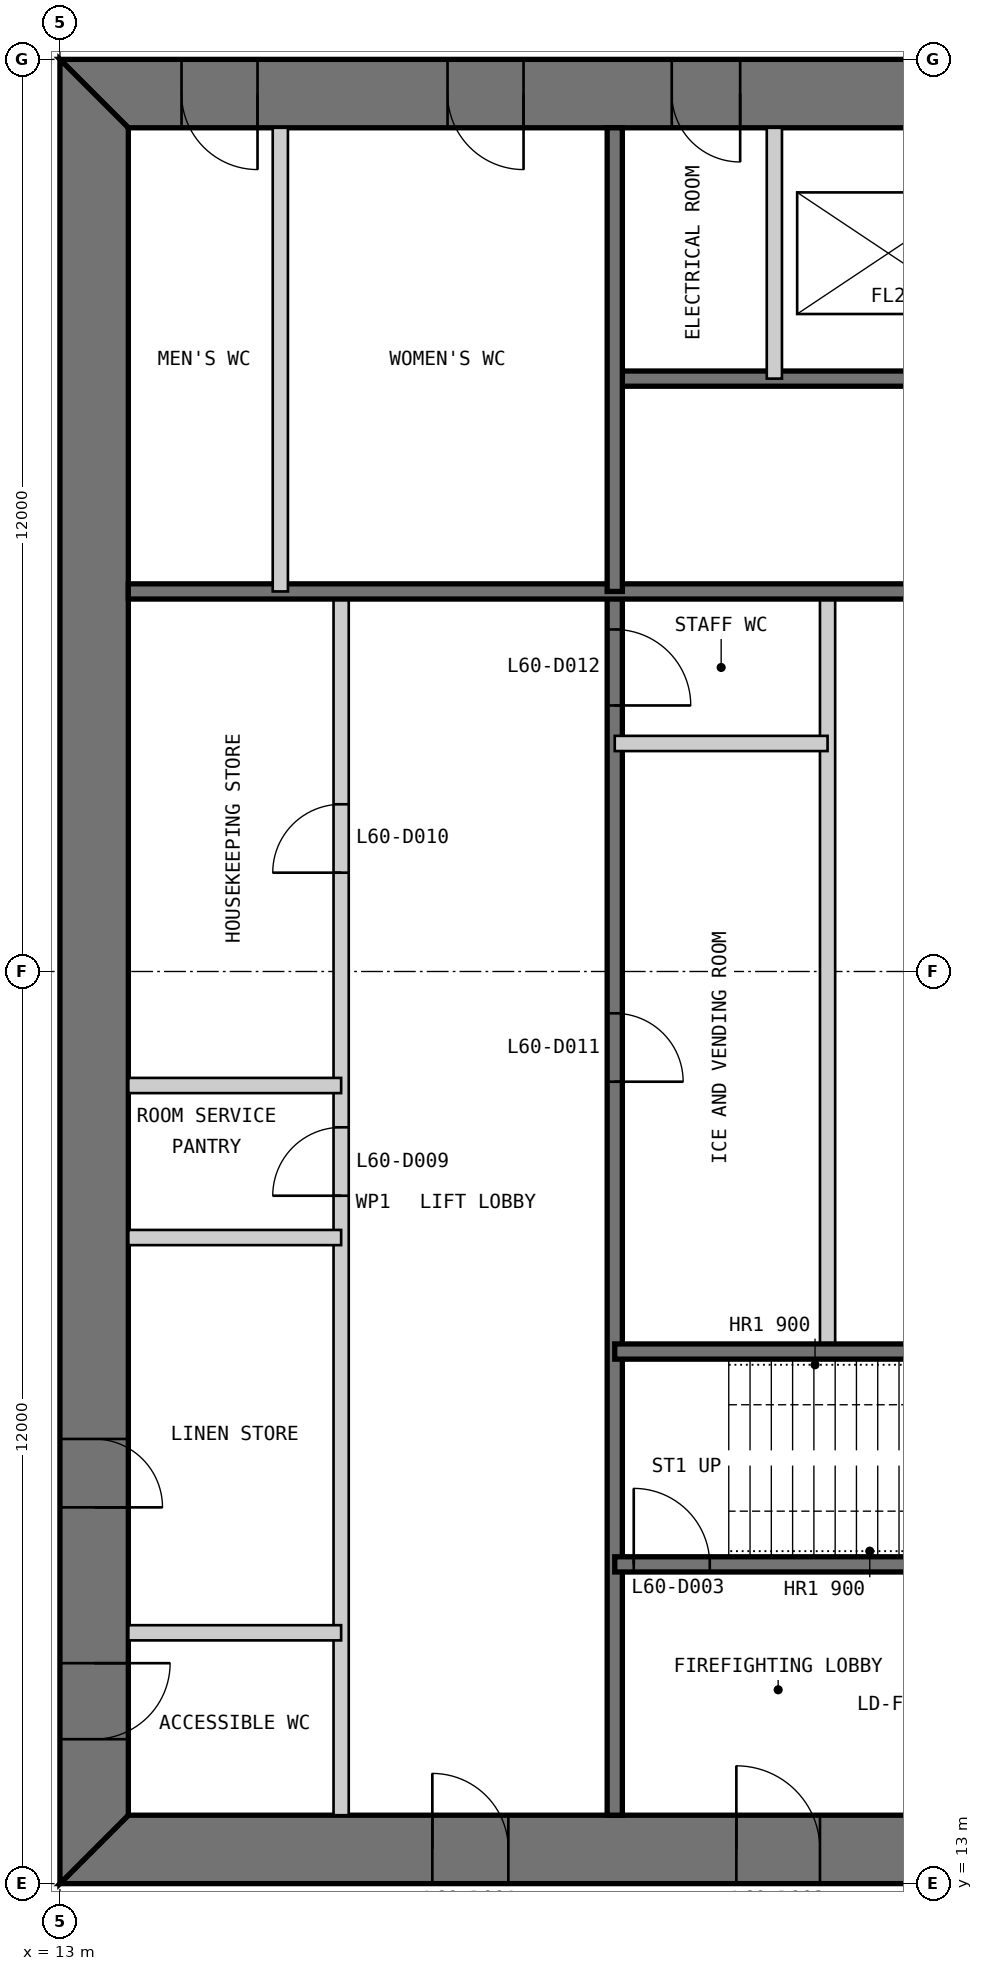
"""IFC4 building model, lengths in metres.
Left out: names, types, materials, properties, quantities, classifications, styles, units other than length and angle.
Written with IfcOpenShell. Run it as: python <this file> out.ifc"""

import sys

from ifc_helpers import new_model, si_unit, direction, frame, frame_2d, origin, place, context, subcontext, project, spatial, polyline, rectangle, outline, extrude, element, fill, save


model = new_model("IFC4")
c1 = context("Model", 3, precision=1e-05, world=origin(), true_north=direction((0.0, 1.0)))
c2 = subcontext(c1, "Body", "Model", "MODEL_VIEW")
j1 = project(units=[si_unit("LENGTHUNIT", "METRE"), si_unit("PLANEANGLEUNIT", "RADIAN")], contexts=[c1])
p1 = place(None, origin())
s1 = spatial("IfcSite", under=j1, at=p1, CompositionType="ELEMENT")
p2 = place(p1, origin())
s2 = spatial("IfcBuilding", under=s1, at=p2, CompositionType="ELEMENT")
p3 = place(p2, frame((0.0, 0.0, 256.0)))
s3 = spatial("IfcBuildingStorey", under=s2, at=p3, CompositionType="ELEMENT", Elevation=256.0)
p4 = place(p3, frame((13.0, 13.45, 0.0), z_axis=(0.0, 0.0, 1.0), x_axis=(1.0, 0.0, 0.0)))
e1 = element("IfcWall", 1, at=p4, inside=s3, PredefinedType="SHEAR", context=c2, shape_type="SweptSolid", body=[
    extrude(outline(polyline([(0.0, -0.45), (24.0, -0.45), (23.1, 0.45), (0.9, 0.45), (0.0, -0.45)])), origin(), (0.0, 0.0, 1.0), 3.4),
])
p5 = place(p4, frame((4.9, 0.0, 0.0)))
e2 = element("IfcOpeningElement", 2, at=p5, cuts=e1, PredefinedType="OPENING", context=c2, shape_type="SweptSolid", body=[
    extrude(rectangle(XDim=1.0, YDim=2.2, at=frame_2d((0.5, 1.1))), frame((0.0, 0.46, 0.0), z_axis=(0.0, -1.0, 0.0), x_axis=(1.0, 0.0, 0.0)), (0.0, 0.0, 1.0), 0.92),
])
p6 = place(p4, frame((8.9, 0.0, 0.0)))
e3 = element("IfcOpeningElement", 3, at=p6, cuts=e1, PredefinedType="OPENING", context=c2, shape_type="SweptSolid", body=[
    extrude(rectangle(XDim=1.1, YDim=2.2, at=frame_2d((0.55, 1.1))), frame((0.0, 0.46, 0.0), z_axis=(0.0, -1.0, 0.0), x_axis=(1.0, 0.0, 0.0)), (0.0, 0.0, 1.0), 0.92),
])
p7 = place(p4, frame((15.05, 0.0, 0.0)))
e4 = element("IfcOpeningElement", 4, at=p7, cuts=e1, PredefinedType="OPENING", context=c2, shape_type="SweptSolid", body=[
    extrude(rectangle(XDim=0.9, YDim=2.2, at=frame_2d((0.45, 1.1))), frame((0.0, 0.46, 0.0), z_axis=(0.0, -1.0, 0.0), x_axis=(1.0, 0.0, 0.0)), (0.0, 0.0, 1.0), 0.92),
])
p8 = place(p4, frame((17.9, 0.0, 0.0)))
e5 = element("IfcOpeningElement", 5, at=p8, cuts=e1, PredefinedType="OPENING", context=c2, shape_type="SweptSolid", body=[
    extrude(rectangle(XDim=1.0, YDim=2.2, at=frame_2d((0.5, 1.1))), frame((0.0, 0.46, 0.0), z_axis=(0.0, -1.0, 0.0), x_axis=(1.0, 0.0, 0.0)), (0.0, 0.0, 1.0), 0.92),
])
p9 = place(p4, frame((21.4, 0.0, 0.0)))
e6 = element("IfcOpeningElement", 6, at=p9, cuts=e1, PredefinedType="OPENING", context=c2, shape_type="SweptSolid", body=[
    extrude(rectangle(XDim=1.0, YDim=2.2, at=frame_2d((0.5, 1.1))), frame((0.0, 0.46, 0.0), z_axis=(0.0, -1.0, 0.0), x_axis=(1.0, 0.0, 0.0)), (0.0, 0.0, 1.0), 0.92),
])
p10 = place(p3, frame((37.0, 36.55, 0.0), z_axis=(0.0, 0.0, 1.0), x_axis=(-1.0, 0.0, 0.0)))
e7 = element("IfcWall", 7, at=p10, inside=s3, PredefinedType="SHEAR", context=c2, shape_type="SweptSolid", body=[
    extrude(outline(polyline([(0.0, -0.45), (24.0, -0.45), (23.1, 0.45), (0.9, 0.45), (0.0, -0.45)])), origin(), (0.0, 0.0, 1.0), 3.4),
])
p11 = place(p10, frame((4.9, 0.0, 0.0)))
e8 = element("IfcOpeningElement", 8, at=p11, cuts=e7, PredefinedType="OPENING", context=c2, shape_type="SweptSolid", body=[
    extrude(rectangle(XDim=1.0, YDim=2.2, at=frame_2d((0.5, 1.1))), frame((0.0, 0.46, 0.0), z_axis=(0.0, -1.0, 0.0), x_axis=(1.0, 0.0, 0.0)), (0.0, 0.0, 1.0), 0.92),
])
p12 = place(p10, frame((8.9, 0.0, 0.0)))
e9 = element("IfcOpeningElement", 9, at=p12, cuts=e7, PredefinedType="OPENING", context=c2, shape_type="SweptSolid", body=[
    extrude(rectangle(XDim=1.1, YDim=2.2, at=frame_2d((0.55, 1.1))), frame((0.0, 0.46, 0.0), z_axis=(0.0, -1.0, 0.0), x_axis=(1.0, 0.0, 0.0)), (0.0, 0.0, 1.0), 0.92),
])
p13 = place(p10, frame((15.05, 0.0, 0.0)))
e10 = element("IfcOpeningElement", 10, at=p13, cuts=e7, PredefinedType="OPENING", context=c2, shape_type="SweptSolid", body=[
    extrude(rectangle(XDim=0.9, YDim=2.2, at=frame_2d((0.45, 1.1))), frame((0.0, 0.46, 0.0), z_axis=(0.0, -1.0, 0.0), x_axis=(1.0, 0.0, 0.0)), (0.0, 0.0, 1.0), 0.92),
])
p14 = place(p10, frame((17.9, 0.0, 0.0)))
e11 = element("IfcOpeningElement", 11, at=p14, cuts=e7, PredefinedType="OPENING", context=c2, shape_type="SweptSolid", body=[
    extrude(rectangle(XDim=1.0, YDim=2.2, at=frame_2d((0.5, 1.1))), frame((0.0, 0.46, 0.0), z_axis=(0.0, -1.0, 0.0), x_axis=(1.0, 0.0, 0.0)), (0.0, 0.0, 1.0), 0.92),
])
p15 = place(p10, frame((21.4, 0.0, 0.0)))
e12 = element("IfcOpeningElement", 12, at=p15, cuts=e7, PredefinedType="OPENING", context=c2, shape_type="SweptSolid", body=[
    extrude(rectangle(XDim=1.0, YDim=2.2, at=frame_2d((0.5, 1.1))), frame((0.0, 0.46, 0.0), z_axis=(0.0, -1.0, 0.0), x_axis=(1.0, 0.0, 0.0)), (0.0, 0.0, 1.0), 0.92),
])
p16 = place(p3, frame((13.45, 36.1, 0.0), z_axis=(0.0, 0.0, 1.0), x_axis=(0.0, -1.0, 0.0)))
e13 = element("IfcWall", 13, at=p16, inside=s3, PredefinedType="SHEAR", context=c2, shape_type="SweptSolid", body=[
    extrude(outline(polyline([(-0.9, -0.45), (23.1, -0.45), (22.2, 0.45), (0.0, 0.45), (-0.9, -0.45)])), origin(), (0.0, 0.0, 1.0), 3.4),
])
p17 = place(p16, frame((20.2, 0.0, 0.0)))
e14 = element("IfcOpeningElement", 14, at=p17, cuts=e13, PredefinedType="OPENING", context=c2, shape_type="SweptSolid", body=[
    extrude(rectangle(XDim=1.0, YDim=2.2, at=frame_2d((0.5, 1.1))), frame((0.0, 0.46, 0.0), z_axis=(0.0, -1.0, 0.0), x_axis=(1.0, 0.0, 0.0)), (0.0, 0.0, 1.0), 0.92),
])
p18 = place(p16, frame((17.25, 0.0, 0.0)))
e15 = element("IfcOpeningElement", 15, at=p18, cuts=e13, PredefinedType="OPENING", context=c2, shape_type="SweptSolid", body=[
    extrude(rectangle(XDim=0.9, YDim=2.2, at=frame_2d((0.45, 1.1))), frame((0.0, 0.46, 0.0), z_axis=(0.0, -1.0, 0.0), x_axis=(1.0, 0.0, 0.0)), (0.0, 0.0, 1.0), 0.92),
])
p19 = place(p3, frame((16.7, 13.9, 0.0), z_axis=(0.0, 0.0, 1.0), x_axis=(0.0, 1.0, 0.0)))
e16 = element("IfcWall", 16, at=p19, inside=s3, PredefinedType="PARTITIONING", context=c2, shape_type="SweptSolid", body=[
    extrude(rectangle(XDim=16.1, YDim=0.2, at=frame_2d((8.05, 0.0))), origin(), (0.0, 0.0, 1.0), 3.2),
])
p20 = place(p19, frame((8.15, 0.0, 0.0)))
e17 = element("IfcOpeningElement", 17, at=p20, cuts=e16, PredefinedType="OPENING", context=c2, shape_type="SweptSolid", body=[
    extrude(rectangle(XDim=0.9, YDim=2.2, at=frame_2d((0.45, 1.1))), frame((0.0, 0.11, 0.0), z_axis=(0.0, -1.0, 0.0), x_axis=(1.0, 0.0, 0.0)), (0.0, 0.0, 1.0), 0.22),
])
p21 = place(p19, frame((12.4, 0.0, 0.0)))
e18 = element("IfcOpeningElement", 18, at=p21, cuts=e16, PredefinedType="OPENING", context=c2, shape_type="SweptSolid", body=[
    extrude(rectangle(XDim=0.9, YDim=2.2, at=frame_2d((0.45, 1.1))), frame((0.0, 0.11, 0.0), z_axis=(0.0, -1.0, 0.0), x_axis=(1.0, 0.0, 0.0)), (0.0, 0.0, 1.0), 0.22),
])
p22 = place(p3, frame((20.3, 13.9, 0.0), z_axis=(0.0, 0.0, 1.0), x_axis=(0.0, 1.0, 0.0)))
e19 = element("IfcWall", 19, at=p22, inside=s3, PredefinedType="SOLIDWALL", context=c2, shape_type="SweptSolid", body=[
    extrude(rectangle(XDim=16.1, YDim=0.2, at=frame_2d((8.05, 0.0))), origin(), (0.0, 0.0, 1.0), 3.2),
])
p23 = place(p22, frame((9.65, 0.0, 0.0)))
e20 = element("IfcOpeningElement", 20, at=p23, cuts=e19, PredefinedType="OPENING", context=c2, shape_type="SweptSolid", body=[
    extrude(rectangle(XDim=0.9, YDim=2.2, at=frame_2d((0.45, 1.1))), frame((0.0, 0.11, 0.0), z_axis=(0.0, -1.0, 0.0), x_axis=(1.0, 0.0, 0.0)), (0.0, 0.0, 1.0), 0.22),
])
p24 = place(p22, frame((14.6, 0.0, 0.0)))
e21 = element("IfcOpeningElement", 21, at=p24, cuts=e19, PredefinedType="OPENING", context=c2, shape_type="SweptSolid", body=[
    extrude(rectangle(XDim=1.0, YDim=2.2, at=frame_2d((0.5, 1.1))), frame((0.0, 0.11, 0.0), z_axis=(0.0, -1.0, 0.0), x_axis=(1.0, 0.0, 0.0)), (0.0, 0.0, 1.0), 0.22),
])
p25 = place(p3, frame((23.1, 20.0, 0.0), z_axis=(0.0, 0.0, 1.0), x_axis=(0.0, 1.0, 0.0)))
e22 = element("IfcWall", 22, at=p25, inside=s3, PredefinedType="PARTITIONING", context=c2, shape_type="SweptSolid", body=[
    extrude(rectangle(XDim=10.0, YDim=0.2, at=frame_2d((5.0, 0.0))), origin(), (0.0, 0.0, 1.0), 3.2),
])
p26 = place(p3, frame((20.3, 17.2, 0.0), z_axis=(0.0, 0.0, 1.0), x_axis=(1.0, 0.0, 0.0)))
e23 = element("IfcWall", 23, at=p26, inside=s3, PredefinedType="SOLIDWALL", context=c2, shape_type="SweptSolid", body=[
    extrude(rectangle(XDim=9.4, YDim=0.2, at=frame_2d((4.7, 0.0))), origin(), (0.0, 0.0, 1.0), 3.2),
])
p27 = place(p26, frame((0.25, 0.0, 0.0)))
e24 = element("IfcOpeningElement", 24, at=p27, cuts=e23, PredefinedType="OPENING", context=c2, shape_type="SweptSolid", body=[
    extrude(rectangle(XDim=1.0, YDim=2.2, at=frame_2d((0.5, 1.1))), frame((0.0, 0.11, 0.0), z_axis=(0.0, -1.0, 0.0), x_axis=(1.0, 0.0, 0.0)), (0.0, 0.0, 1.0), 0.22),
])
p28 = place(p3, frame((20.3, 20.0, 0.0), z_axis=(0.0, 0.0, 1.0), x_axis=(1.0, 0.0, 0.0)))
e25 = element("IfcWall", 25, at=p28, inside=s3, PredefinedType="SOLIDWALL", context=c2, shape_type="SweptSolid", body=[
    extrude(rectangle(XDim=15.8, YDim=0.2, at=frame_2d((7.9, 0.0))), origin(), (0.0, 0.0, 1.0), 3.2),
])
for number, where, z_axis, x_axis in (
    (26, (13.9, 16.3, 0.0), (0.0, 0.0, 1.0), (1.0, 0.0, 0.0)),
    (27, (13.9, 21.5, 0.0), (0.0, 0.0, 1.0), (1.0, 0.0, 0.0)),
    (28, (13.9, 23.5, 0.0), (0.0, 0.0, 1.0), (1.0, 0.0, 0.0)),
    (29, (20.3, 28.0, 0.0), (0.0, 0.0, 1.0), (1.0, 0.0, 0.0)),
):
    element("IfcWall", number, at=place(p3, frame(where, z_axis=z_axis, x_axis=x_axis)), inside=s3, PredefinedType="PARTITIONING", context=c2, shape_type="SweptSolid", body=[
        extrude(rectangle(XDim=2.8, YDim=0.2, at=frame_2d((1.4, 0.0))), origin(), (0.0, 0.0, 1.0), 3.2),
    ])
p29 = place(p3, frame((29.7, 32.8, 0.0), z_axis=(0.0, 0.0, 1.0), x_axis=(-1.0, 0.0, 0.0)))
e30 = element("IfcWall", 30, at=p29, inside=s3, PredefinedType="SOLIDWALL", context=c2, shape_type="SweptSolid", body=[
    extrude(rectangle(XDim=9.4, YDim=0.2, at=frame_2d((4.7, 0.0))), origin(), (0.0, 0.0, 1.0), 3.2),
])
p30 = place(p29, frame((0.25, 0.0, 0.0)))
e31 = element("IfcOpeningElement", 31, at=p30, cuts=e30, PredefinedType="OPENING", context=c2, shape_type="SweptSolid", body=[
    extrude(rectangle(XDim=1.0, YDim=2.2, at=frame_2d((0.5, 1.1))), frame((0.0, 0.11, 0.0), z_axis=(0.0, -1.0, 0.0), x_axis=(1.0, 0.0, 0.0)), (0.0, 0.0, 1.0), 0.22),
])
p31 = place(p3, frame((29.7, 30.0, 0.0), z_axis=(0.0, 0.0, 1.0), x_axis=(-1.0, 0.0, 0.0)))
e32 = element("IfcWall", 32, at=p31, inside=s3, PredefinedType="SOLIDWALL", context=c2, shape_type="SweptSolid", body=[
    extrude(rectangle(XDim=15.8, YDim=0.2, at=frame_2d((7.9, 0.0))), origin(), (0.0, 0.0, 1.0), 3.2),
])
p32 = place(p3, frame((22.4, 36.1, 0.0), z_axis=(0.0, 0.0, 1.0), x_axis=(0.0, -1.0, 0.0)))
e33 = element("IfcWall", 33, at=p32, inside=s3, PredefinedType="PARTITIONING", context=c2, shape_type="SweptSolid", body=[
    extrude(rectangle(XDim=3.3, YDim=0.2, at=frame_2d((1.65, 0.0))), origin(), (0.0, 0.0, 1.0), 3.2),
])
p33 = place(p3, frame((20.3, 36.1, 0.0), z_axis=(0.0, 0.0, 1.0), x_axis=(0.0, -1.0, 0.0)))
e34 = element("IfcWall", 34, at=p33, inside=s3, PredefinedType="SOLIDWALL", context=c2, shape_type="SweptSolid", body=[
    extrude(rectangle(XDim=6.1, YDim=0.2, at=frame_2d((3.05, 0.0))), origin(), (0.0, 0.0, 1.0), 3.2),
])
p34 = place(p3, frame((15.9, 36.1, 0.0), z_axis=(0.0, 0.0, 1.0), x_axis=(0.0, -1.0, 0.0)))
e35 = element("IfcWall", 35, at=p34, inside=s3, PredefinedType="PARTITIONING", context=c2, shape_type="SweptSolid", body=[
    extrude(rectangle(XDim=6.1, YDim=0.2, at=frame_2d((3.05, 0.0))), origin(), (0.0, 0.0, 1.0), 3.2),
])
p35 = place(p5, origin())
e36 = element("IfcDoor", 36, at=p35, inside=s3, OperationType="SINGLE_SWING_LEFT", PredefinedType="DOOR", context=c2, shape_type="SweptSolid", body=[
    extrude(rectangle(XDim=1.0, YDim=2.2, at=frame_2d((0.5, 1.1))), frame((0.0, 0.025, 0.0), z_axis=(0.0, -1.0, 0.0), x_axis=(1.0, 0.0, 0.0)), (0.0, 0.0, 1.0), 0.05),
    extrude(outline(polyline([(0.0, 0.0), (0.04, 0.0), (0.04, 2.16), (0.96, 2.16), (0.96, 0.0), (1.0, 0.0), (1.0, 2.2), (0.0, 2.2), (0.0, 0.0)])), frame((0.0, 0.3, 0.0), z_axis=(0.0, -1.0, 0.0), x_axis=(1.0, 0.0, 0.0)), (0.0, 0.0, 1.0), 0.6),
])
fill(e2, e36)
p36 = place(p6, origin())
e37 = element("IfcDoor", 37, at=p36, inside=s3, OperationType="SINGLE_SWING_LEFT", PredefinedType="DOOR", context=c2, shape_type="SweptSolid", body=[
    extrude(rectangle(XDim=1.1, YDim=2.2, at=frame_2d((0.55, 1.1))), frame((0.0, 0.025, 0.0), z_axis=(0.0, -1.0, 0.0), x_axis=(1.0, 0.0, 0.0)), (0.0, 0.0, 1.0), 0.05),
    extrude(outline(polyline([(0.0, 0.0), (0.04, 0.0), (0.04, 2.16), (1.06, 2.16), (1.06, 0.0), (1.1, 0.0), (1.1, 2.2), (0.0, 2.2), (0.0, 0.0)])), frame((0.0, 0.3, 0.0), z_axis=(0.0, -1.0, 0.0), x_axis=(1.0, 0.0, 0.0)), (0.0, 0.0, 1.0), 0.6),
])
fill(e3, e37)
p37 = place(p27, origin())
e38 = element("IfcDoor", 38, at=p37, inside=s3, OperationType="SINGLE_SWING_LEFT", PredefinedType="DOOR", context=c2, shape_type="SweptSolid", body=[
    extrude(rectangle(XDim=1.0, YDim=2.2, at=frame_2d((0.5, 1.1))), frame((0.0, 0.025, 0.0), z_axis=(0.0, -1.0, 0.0), x_axis=(1.0, 0.0, 0.0)), (0.0, 0.0, 1.0), 0.05),
])
fill(e24, e38)
p38 = place(p17, origin())
e39 = element("IfcDoor", 39, at=p38, inside=s3, OperationType="SINGLE_SWING_LEFT", PredefinedType="DOOR", context=c2, shape_type="SweptSolid", body=[
    extrude(rectangle(XDim=1.0, YDim=2.2, at=frame_2d((0.5, 1.1))), frame((0.0, 0.025, 0.0), z_axis=(0.0, -1.0, 0.0), x_axis=(1.0, 0.0, 0.0)), (0.0, 0.0, 1.0), 0.05),
    extrude(outline(polyline([(0.0, 0.0), (0.04, 0.0), (0.04, 2.16), (0.96, 2.16), (0.96, 0.0), (1.0, 0.0), (1.0, 2.2), (0.0, 2.2), (0.0, 0.0)])), frame((0.0, 0.3, 0.0), z_axis=(0.0, -1.0, 0.0), x_axis=(1.0, 0.0, 0.0)), (0.0, 0.0, 1.0), 0.6),
])
fill(e14, e39)
p39 = place(p18, origin())
e40 = element("IfcDoor", 40, at=p39, inside=s3, OperationType="SINGLE_SWING_RIGHT", PredefinedType="DOOR", context=c2, shape_type="SweptSolid", body=[
    extrude(rectangle(XDim=0.9, YDim=2.2, at=frame_2d((0.45, 1.1))), frame((0.0, 0.025, 0.0), z_axis=(0.0, -1.0, 0.0), x_axis=(1.0, 0.0, 0.0)), (0.0, 0.0, 1.0), 0.05),
    extrude(outline(polyline([(0.0, 0.0), (0.04, 0.0), (0.04, 2.16), (0.86, 2.16), (0.86, 0.0), (0.9, 0.0), (0.9, 2.2), (0.0, 2.2), (0.0, 0.0)])), frame((0.0, 0.3, 0.0), z_axis=(0.0, -1.0, 0.0), x_axis=(1.0, 0.0, 0.0)), (0.0, 0.0, 1.0), 0.6),
])
fill(e15, e40)
p40 = place(p20, origin())
e41 = element("IfcDoor", 41, at=p40, inside=s3, OperationType="SINGLE_SWING_LEFT", PredefinedType="DOOR", context=c2, shape_type="SweptSolid", body=[
    extrude(rectangle(XDim=0.9, YDim=2.2, at=frame_2d((0.45, 1.1))), frame((0.0, 0.025, 0.0), z_axis=(0.0, -1.0, 0.0), x_axis=(1.0, 0.0, 0.0)), (0.0, 0.0, 1.0), 0.05),
])
fill(e17, e41)
p41 = place(p21, origin())
e42 = element("IfcDoor", 42, at=p41, inside=s3, OperationType="SINGLE_SWING_LEFT", PredefinedType="DOOR", context=c2, shape_type="SweptSolid", body=[
    extrude(rectangle(XDim=0.9, YDim=2.2, at=frame_2d((0.45, 1.1))), frame((0.0, 0.025, 0.0), z_axis=(0.0, -1.0, 0.0), x_axis=(1.0, 0.0, 0.0)), (0.0, 0.0, 1.0), 0.05),
])
fill(e18, e42)
p42 = place(p23, frame((0.9, 0.0, 0.0), z_axis=(0.0, 0.0, 1.0), x_axis=(-1.0, 0.0, 0.0)))
e43 = element("IfcDoor", 43, at=p42, inside=s3, OperationType="SINGLE_SWING_RIGHT", PredefinedType="DOOR", context=c2, shape_type="SweptSolid", body=[
    extrude(rectangle(XDim=0.9, YDim=2.2, at=frame_2d((0.45, 1.1))), frame((0.0, 0.025, 0.0), z_axis=(0.0, -1.0, 0.0), x_axis=(1.0, 0.0, 0.0)), (0.0, 0.0, 1.0), 0.05),
])
fill(e20, e43)
p43 = place(p24, frame((1.0, 0.0, 0.0), z_axis=(0.0, 0.0, 1.0), x_axis=(-1.0, 0.0, 0.0)))
e44 = element("IfcDoor", 44, at=p43, inside=s3, OperationType="SINGLE_SWING_RIGHT", PredefinedType="DOOR", context=c2, shape_type="SweptSolid", body=[
    extrude(rectangle(XDim=1.0, YDim=2.2, at=frame_2d((0.5, 1.1))), frame((0.0, 0.025, 0.0), z_axis=(0.0, -1.0, 0.0), x_axis=(1.0, 0.0, 0.0)), (0.0, 0.0, 1.0), 0.05),
])
fill(e21, e44)
p44 = place(p13, origin())
e45 = element("IfcDoor", 45, at=p44, inside=s3, OperationType="SINGLE_SWING_LEFT", PredefinedType="DOOR", context=c2, shape_type="SweptSolid", body=[
    extrude(rectangle(XDim=0.9, YDim=2.2, at=frame_2d((0.45, 1.1))), frame((0.0, 0.025, 0.0), z_axis=(0.0, -1.0, 0.0), x_axis=(1.0, 0.0, 0.0)), (0.0, 0.0, 1.0), 0.05),
    extrude(outline(polyline([(0.0, 0.0), (0.04, 0.0), (0.04, 2.16), (0.86, 2.16), (0.86, 0.0), (0.9, 0.0), (0.9, 2.2), (0.0, 2.2), (0.0, 0.0)])), frame((0.0, 0.3, 0.0), z_axis=(0.0, -1.0, 0.0), x_axis=(1.0, 0.0, 0.0)), (0.0, 0.0, 1.0), 0.6),
])
fill(e10, e45)
p45 = place(p14, origin())
e46 = element("IfcDoor", 46, at=p45, inside=s3, OperationType="SINGLE_SWING_LEFT", PredefinedType="DOOR", context=c2, shape_type="SweptSolid", body=[
    extrude(rectangle(XDim=1.0, YDim=2.2, at=frame_2d((0.5, 1.1))), frame((0.0, 0.025, 0.0), z_axis=(0.0, -1.0, 0.0), x_axis=(1.0, 0.0, 0.0)), (0.0, 0.0, 1.0), 0.05),
    extrude(outline(polyline([(0.0, 0.0), (0.04, 0.0), (0.04, 2.16), (0.96, 2.16), (0.96, 0.0), (1.0, 0.0), (1.0, 2.2), (0.0, 2.2), (0.0, 0.0)])), frame((0.0, 0.3, 0.0), z_axis=(0.0, -1.0, 0.0), x_axis=(1.0, 0.0, 0.0)), (0.0, 0.0, 1.0), 0.6),
])
fill(e11, e46)
p46 = place(p15, origin())
e47 = element("IfcDoor", 47, at=p46, inside=s3, OperationType="SINGLE_SWING_LEFT", PredefinedType="DOOR", context=c2, shape_type="SweptSolid", body=[
    extrude(rectangle(XDim=1.0, YDim=2.2, at=frame_2d((0.5, 1.1))), frame((0.0, 0.025, 0.0), z_axis=(0.0, -1.0, 0.0), x_axis=(1.0, 0.0, 0.0)), (0.0, 0.0, 1.0), 0.05),
    extrude(outline(polyline([(0.0, 0.0), (0.04, 0.0), (0.04, 2.16), (0.96, 2.16), (0.96, 0.0), (1.0, 0.0), (1.0, 2.2), (0.0, 2.2), (0.0, 0.0)])), frame((0.0, 0.3, 0.0), z_axis=(0.0, -1.0, 0.0), x_axis=(1.0, 0.0, 0.0)), (0.0, 0.0, 1.0), 0.6),
])
fill(e12, e47)
save(model, sys.argv[1])
